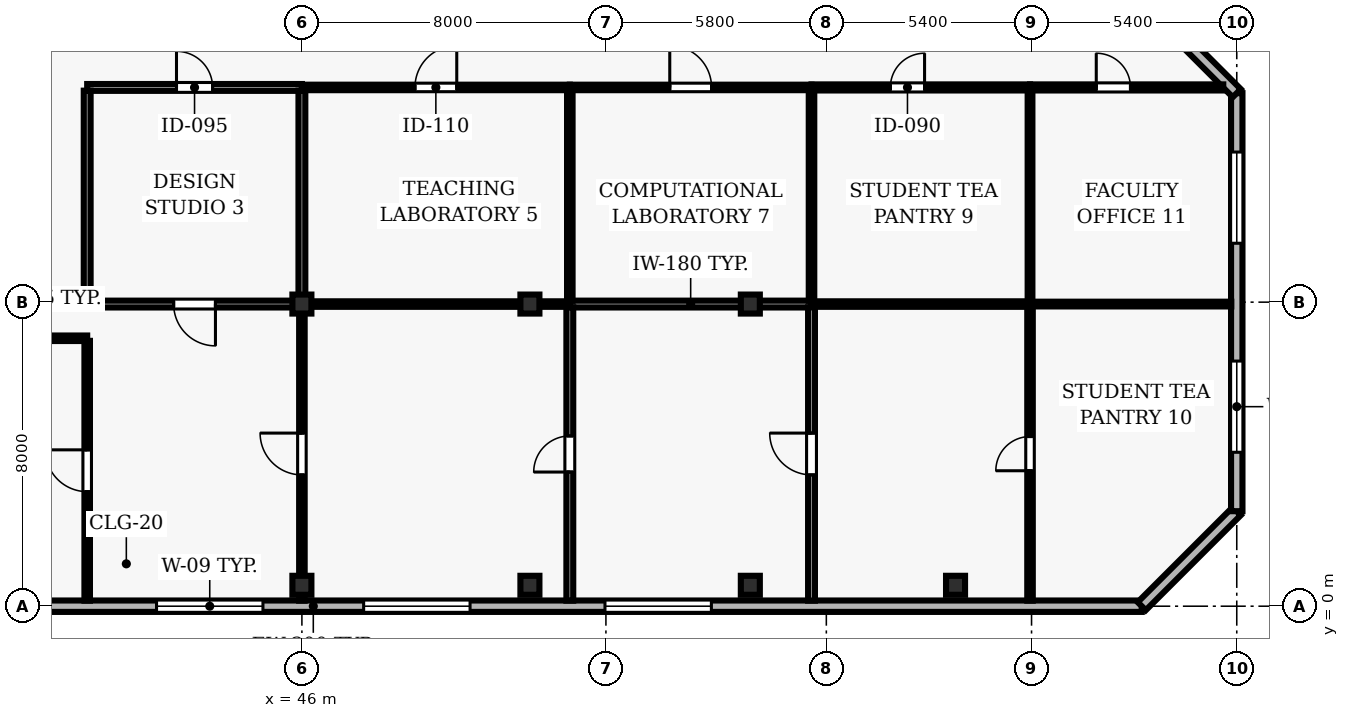
"""IFC4 building model, lengths in metres.
Left out: names, types, materials, properties, quantities, classifications, styles, units other than length and angle.
Written with IfcOpenShell. Run it as: python <this file> out.ifc"""

import sys

from ifc_helpers import new_model, si_unit, direction, frame, frame_2d, origin, origin_2d, place, context, subcontext, project, spatial, rectangle, hollow_rectangle, extrude, element, fill, save


model = new_model("IFC4")
c1 = context("Model", 3, precision=1e-05, world=origin(), true_north=direction((0.0, 1.0)))
c2 = subcontext(c1, "Body", "Model", "MODEL_VIEW")
j1 = project(units=[si_unit("LENGTHUNIT", "METRE"), si_unit("PLANEANGLEUNIT", "RADIAN")], contexts=[c1])
p1 = place(None, origin())
s1 = spatial("IfcSite", under=j1, at=p1, CompositionType="ELEMENT")
p2 = place(p1, origin())
s2 = spatial("IfcBuilding", under=s1, at=p2, CompositionType="ELEMENT")
p3 = place(p2, frame((0.0, 0.0, 134.6)))
s3 = spatial("IfcBuildingStorey", under=s2, at=p3, CompositionType="ELEMENT", Elevation=134.6)
for number, where, z_axis, x_axis in (
    (1, (46.0, 0.55, 0.0), (0.0, 0.0, 1.0), (1.0, 0.0, 0.0)),
    (2, (46.0, 7.95, 0.0), (0.0, 0.0, 1.0), (1.0, 0.0, 0.0)),
    (3, (52.0, 0.55, 0.0), (0.0, 0.0, 1.0), (1.0, 0.0, 0.0)),
    (4, (52.0, 7.95, 0.0), (0.0, 0.0, 1.0), (1.0, 0.0, 0.0)),
    (5, (57.8, 0.55, 0.0), (0.0, 0.0, 1.0), (1.0, 0.0, 0.0)),
    (6, (57.8, 7.95, 0.0), (0.0, 0.0, 1.0), (1.0, 0.0, 0.0)),
    (7, (63.2, 0.55, 0.0), (0.0, 0.0, 1.0), (1.0, 0.0, 0.0)),
):
    element("IfcColumn", number, at=place(p3, frame(where, z_axis=z_axis, x_axis=x_axis)), inside=s3, PredefinedType="COLUMN", context=c2, shape_type="SweptSolid", body=[
        extrude(hollow_rectangle(XDim=0.5, YDim=0.5, WallThickness=0.025, at=origin_2d()), origin(), (0.0, 0.0, 1.0), 3.9),
    ])
p4 = place(p3, frame((24.5, 0.0, 0.0), z_axis=(0.0, 0.0, 1.0), x_axis=(1.0, 0.0, 0.0)))
e8 = element("IfcWall", 8, at=p4, inside=s3, PredefinedType="SOLIDWALL", context=c2, shape_type="SweptSolid", body=[
    extrude(rectangle(XDim=43.6, YDim=0.3, at=frame_2d((21.8, 0.0))), origin(), (0.0, 0.0, 1.0), 3.69),
])
p5 = place(p4, frame((1.325, 0.0, 0.9)))
e9 = element("IfcOpeningElement", 9, at=p5, cuts=e8, PredefinedType="OPENING", context=c2, shape_type="SweptSolid", body=[
    extrude(rectangle(XDim=2.8, YDim=1.8, at=frame_2d((1.4, 0.9))), frame((0.0, 0.16, 0.0), z_axis=(0.0, -1.0, 0.0), x_axis=(1.0, 0.0, 0.0)), (0.0, 0.0, 1.0), 0.32),
])
p6 = place(p4, frame((17.675, 0.0, 0.9)))
e10 = element("IfcOpeningElement", 10, at=p6, cuts=e8, PredefinedType="OPENING", context=c2, shape_type="SweptSolid", body=[
    extrude(rectangle(XDim=2.8, YDim=1.8, at=frame_2d((1.4, 0.9))), frame((0.0, 0.16, 0.0), z_axis=(0.0, -1.0, 0.0), x_axis=(1.0, 0.0, 0.0)), (0.0, 0.0, 1.0), 0.32),
])
p7 = place(p4, frame((23.125, 0.0, 0.9)))
e11 = element("IfcOpeningElement", 11, at=p7, cuts=e8, PredefinedType="OPENING", context=c2, shape_type="SweptSolid", body=[
    extrude(rectangle(XDim=2.8, YDim=1.8, at=frame_2d((1.4, 0.9))), frame((0.0, 0.16, 0.0), z_axis=(0.0, -1.0, 0.0), x_axis=(1.0, 0.0, 0.0)), (0.0, 0.0, 1.0), 0.32),
])
p8 = place(p4, frame((29.475, 0.0, 0.9)))
e12 = element("IfcOpeningElement", 12, at=p8, cuts=e8, PredefinedType="OPENING", context=c2, shape_type="SweptSolid", body=[
    extrude(rectangle(XDim=2.8, YDim=1.8, at=frame_2d((1.4, 0.9))), frame((0.0, 0.16, 0.0), z_axis=(0.0, -1.0, 0.0), x_axis=(1.0, 0.0, 0.0)), (0.0, 0.0, 1.0), 0.32),
])
p9 = place(p3, frame((68.1, 0.0, 0.0), z_axis=(0.0, 0.0, 1.0), x_axis=(0.707106781187, 0.707106781187, 0.0)))
e13 = element("IfcWall", 13, at=p9, inside=s3, PredefinedType="SOLIDWALL", context=c2, shape_type="SweptSolid", body=[
    extrude(rectangle(XDim=3.536, YDim=0.3, at=frame_2d((1.768, 0.0))), origin(), (0.0, 0.0, 1.0), 3.69),
])
p10 = place(p3, frame((70.6, 2.5, 0.0), z_axis=(0.0, 0.0, 1.0), x_axis=(0.0, 1.0, 0.0)))
e14 = element("IfcWall", 14, at=p10, inside=s3, PredefinedType="SOLIDWALL", context=c2, shape_type="SweptSolid", body=[
    extrude(rectangle(XDim=11.0, YDim=0.3, at=frame_2d((5.5, 0.0))), origin(), (0.0, 0.0, 1.0), 3.69),
])
p11 = place(p10, frame((1.55, 0.0, 0.9)))
e15 = element("IfcOpeningElement", 15, at=p11, cuts=e14, PredefinedType="OPENING", context=c2, shape_type="SweptSolid", body=[
    extrude(rectangle(XDim=2.4, YDim=2.2, at=frame_2d((1.2, 1.1))), frame((0.0, 0.16, 0.0), z_axis=(0.0, -1.0, 0.0), x_axis=(1.0, 0.0, 0.0)), (0.0, 0.0, 1.0), 0.32),
])
p12 = place(p10, frame((7.05, 0.0, 0.9)))
e16 = element("IfcOpeningElement", 16, at=p12, cuts=e14, PredefinedType="OPENING", context=c2, shape_type="SweptSolid", body=[
    extrude(rectangle(XDim=2.4, YDim=2.2, at=frame_2d((1.2, 1.1))), frame((0.0, 0.16, 0.0), z_axis=(0.0, -1.0, 0.0), x_axis=(1.0, 0.0, 0.0)), (0.0, 0.0, 1.0), 0.32),
])
p13 = place(p3, frame((70.6, 13.5, 0.0), z_axis=(0.0, 0.0, 1.0), x_axis=(-0.707106781187, 0.707106781187, 0.0)))
e17 = element("IfcWall", 17, at=p13, inside=s3, PredefinedType="SOLIDWALL", context=c2, shape_type="SweptSolid", body=[
    extrude(rectangle(XDim=3.536, YDim=0.3, at=frame_2d((1.768, 0.0))), origin(), (0.0, 0.0, 1.0), 3.69),
])
p14 = place(p3, frame((38.05, 7.05, 0.0), z_axis=(0.0, 0.0, 1.0), x_axis=(1.0, 0.0, 0.0)))
e18 = element("IfcWall", 18, at=p14, inside=s3, PredefinedType="PARTITIONING", context=c2, shape_type="SweptSolid", body=[
    extrude(rectangle(XDim=2.3, YDim=0.145, at=frame_2d((1.15, 0.0))), origin(), (0.0, 0.0, 1.0), 3.69),
])
p15 = place(p3, frame((40.35, 13.65, 0.0), z_axis=(0.0, 0.0, 1.0), x_axis=(1.0, 0.0, 0.0)))
e19 = element("IfcWall", 19, at=p15, inside=s3, PredefinedType="PARTITIONING", context=c2, shape_type="SweptSolid", body=[
    extrude(rectangle(XDim=5.65, YDim=0.18, at=frame_2d((2.825, 0.0))), origin(), (0.0, 0.0, 1.0), 3.69),
])
p16 = place(p15, frame((2.35, 0.0, 0.0)))
e20 = element("IfcOpeningElement", 20, at=p16, cuts=e19, PredefinedType="OPENING", context=c2, shape_type="SweptSolid", body=[
    extrude(rectangle(XDim=0.95, YDim=2.1, at=frame_2d((0.475, 1.05))), frame((0.0, 0.1, 0.0), z_axis=(0.0, -1.0, 0.0), x_axis=(1.0, 0.0, 0.0)), (0.0, 0.0, 1.0), 0.2),
])
p17 = place(p3, frame((46.0, 7.95, 0.0), z_axis=(0.0, 0.0, 1.0), x_axis=(-1.0, 0.0, 0.0)))
e21 = element("IfcWall", 21, at=p17, inside=s3, PredefinedType="PARTITIONING", context=c2, shape_type="SweptSolid", body=[
    extrude(rectangle(XDim=5.65, YDim=0.18, at=frame_2d((2.825, 0.0))), origin(), (0.0, 0.0, 1.0), 3.074),
])
p18 = place(p17, frame((2.275, 0.0, 0.0)))
e22 = element("IfcOpeningElement", 22, at=p18, cuts=e21, PredefinedType="OPENING", context=c2, shape_type="SweptSolid", body=[
    extrude(rectangle(XDim=1.1, YDim=2.15, at=frame_2d((0.55, 1.075))), frame((0.0, 0.1, 0.0), z_axis=(0.0, -1.0, 0.0), x_axis=(1.0, 0.0, 0.0)), (0.0, 0.0, 1.0), 0.2),
])
p19 = place(p3, frame((46.0, 13.65, 0.0), z_axis=(0.0, 0.0, 1.0), x_axis=(1.0, 0.0, 0.0)))
e23 = element("IfcWall", 23, at=p19, inside=s3, PredefinedType="PARTITIONING", context=c2, shape_type="SweptSolid", body=[
    extrude(rectangle(XDim=7.05, YDim=0.145, at=frame_2d((3.525, 0.0))), origin(), (0.0, 0.0, 1.0), 3.69),
])
p20 = place(p19, frame((2.975, 0.0, 0.0)))
e24 = element("IfcOpeningElement", 24, at=p20, cuts=e23, PredefinedType="OPENING", context=c2, shape_type="SweptSolid", body=[
    extrude(rectangle(XDim=1.1, YDim=2.15, at=frame_2d((0.55, 1.075))), frame((0.0, 0.083, 0.0), z_axis=(0.0, -1.0, 0.0), x_axis=(1.0, 0.0, 0.0)), (0.0, 0.0, 1.0), 0.165),
])
p21 = place(p3, frame((53.05, 7.95, 0.0), z_axis=(0.0, 0.0, 1.0), x_axis=(-1.0, 0.0, 0.0)))
e25 = element("IfcWall", 25, at=p21, inside=s3, PredefinedType="PARTITIONING", context=c2, shape_type="SweptSolid", body=[
    extrude(rectangle(XDim=7.05, YDim=0.145, at=frame_2d((3.525, 0.0))), origin(), (0.0, 0.0, 1.0), 3.074),
])
p22 = place(p3, frame((53.05, 13.65, 0.0), z_axis=(0.0, 0.0, 1.0), x_axis=(1.0, 0.0, 0.0)))
e26 = element("IfcWall", 26, at=p22, inside=s3, PredefinedType="PARTITIONING", context=c2, shape_type="SweptSolid", body=[
    extrude(rectangle(XDim=6.36, YDim=0.145, at=frame_2d((3.18, 0.0))), origin(), (0.0, 0.0, 1.0), 3.69),
])
p23 = place(p22, frame((2.63, 0.0, 0.0)))
e27 = element("IfcOpeningElement", 27, at=p23, cuts=e26, PredefinedType="OPENING", context=c2, shape_type="SweptSolid", body=[
    extrude(rectangle(XDim=1.1, YDim=2.15, at=frame_2d((0.55, 1.075))), frame((0.0, 0.083, 0.0), z_axis=(0.0, -1.0, 0.0), x_axis=(1.0, 0.0, 0.0)), (0.0, 0.0, 1.0), 0.165),
])
p24 = place(p3, frame((59.41, 7.95, 0.0), z_axis=(0.0, 0.0, 1.0), x_axis=(-1.0, 0.0, 0.0)))
e28 = element("IfcWall", 28, at=p24, inside=s3, PredefinedType="PARTITIONING", context=c2, shape_type="SweptSolid", body=[
    extrude(rectangle(XDim=6.36, YDim=0.18, at=frame_2d((3.18, 0.0))), origin(), (0.0, 0.0, 1.0), 3.074),
])
p25 = place(p3, frame((59.41, 13.65, 0.0), z_axis=(0.0, 0.0, 1.0), x_axis=(1.0, 0.0, 0.0)))
e29 = element("IfcWall", 29, at=p25, inside=s3, PredefinedType="PARTITIONING", context=c2, shape_type="SweptSolid", body=[
    extrude(rectangle(XDim=5.75, YDim=0.16, at=frame_2d((2.875, 0.0))), origin(), (0.0, 0.0, 1.0), 3.69),
])
p26 = place(p25, frame((2.075, 0.0, 0.0)))
e30 = element("IfcOpeningElement", 30, at=p26, cuts=e29, PredefinedType="OPENING", context=c2, shape_type="SweptSolid", body=[
    extrude(rectangle(XDim=0.9, YDim=2.1, at=frame_2d((0.45, 1.05))), frame((0.0, 0.09, 0.0), z_axis=(0.0, -1.0, 0.0), x_axis=(1.0, 0.0, 0.0)), (0.0, 0.0, 1.0), 0.18),
])
p27 = place(p3, frame((65.16, 7.95, 0.0), z_axis=(0.0, 0.0, 1.0), x_axis=(-1.0, 0.0, 0.0)))
e31 = element("IfcWall", 31, at=p27, inside=s3, PredefinedType="PARTITIONING", context=c2, shape_type="SweptSolid", body=[
    extrude(rectangle(XDim=5.75, YDim=0.145, at=frame_2d((2.875, 0.0))), origin(), (0.0, 0.0, 1.0), 3.69),
])
p28 = place(p3, frame((65.16, 13.65, 0.0), z_axis=(0.0, 0.0, 1.0), x_axis=(1.0, 0.0, 0.0)))
e32 = element("IfcWall", 32, at=p28, inside=s3, PredefinedType="PARTITIONING", context=c2, shape_type="SweptSolid", body=[
    extrude(rectangle(XDim=5.085, YDim=0.16, at=frame_2d((2.542, 0.0))), origin(), (0.0, 0.0, 1.0), 3.69),
])
p29 = place(p28, frame((1.743, 0.0, 0.0)))
e33 = element("IfcOpeningElement", 33, at=p29, cuts=e32, PredefinedType="OPENING", context=c2, shape_type="SweptSolid", body=[
    extrude(rectangle(XDim=0.9, YDim=2.1, at=frame_2d((0.45, 1.05))), frame((0.0, 0.09, 0.0), z_axis=(0.0, -1.0, 0.0), x_axis=(1.0, 0.0, 0.0)), (0.0, 0.0, 1.0), 0.18),
])
p30 = place(p3, frame((70.455, 7.95, 0.0), z_axis=(0.0, 0.0, 1.0), x_axis=(-1.0, 0.0, 0.0)))
e34 = element("IfcWall", 34, at=p30, inside=s3, PredefinedType="PARTITIONING", context=c2, shape_type="SweptSolid", body=[
    extrude(rectangle(XDim=5.295, YDim=0.125, at=frame_2d((2.647, 0.0))), origin(), (0.0, 0.0, 1.0), 3.69),
])
p31 = place(p3, frame((40.35, 0.145, 0.0), z_axis=(0.0, 0.0, 1.0), x_axis=(0.0, 1.0, 0.0)))
e35 = element("IfcWall", 35, at=p31, inside=s3, PredefinedType="PARTITIONING", context=c2, shape_type="SweptSolid", body=[
    extrude(rectangle(XDim=6.837, YDim=0.145, at=frame_2d((3.418, 0.0))), origin(), (0.0, 0.0, 1.0), 3.69),
])
p32 = place(p31, frame((2.869, 0.0, 0.0)))
e36 = element("IfcOpeningElement", 36, at=p32, cuts=e35, PredefinedType="OPENING", context=c2, shape_type="SweptSolid", body=[
    extrude(rectangle(XDim=1.1, YDim=2.15, at=frame_2d((0.55, 1.075))), frame((0.0, 0.083, 0.0), z_axis=(0.0, -1.0, 0.0), x_axis=(1.0, 0.0, 0.0)), (0.0, 0.0, 1.0), 0.165),
])
p33 = place(p3, frame((40.35, 8.035, 0.0), z_axis=(0.0, 0.0, 1.0), x_axis=(0.0, 1.0, 0.0)))
e37 = element("IfcWall", 37, at=p33, inside=s3, PredefinedType="PARTITIONING", context=c2, shape_type="SweptSolid", body=[
    extrude(rectangle(XDim=5.53, YDim=0.18, at=frame_2d((2.765, 0.0))), origin(), (0.0, 0.0, 1.0), 3.69),
])
p34 = place(p3, frame((46.0, 0.145, 0.0), z_axis=(0.0, 0.0, 1.0), x_axis=(0.0, 1.0, 0.0)))
e38 = element("IfcWall", 38, at=p34, inside=s3, PredefinedType="PARTITIONING", context=c2, shape_type="SweptSolid", body=[
    extrude(rectangle(XDim=7.72, YDim=0.145, at=frame_2d((3.86, 0.0))), origin(), (0.0, 0.0, 1.0), 3.074),
])
p35 = place(p34, frame((3.31, 0.0, 0.0)))
e39 = element("IfcOpeningElement", 39, at=p35, cuts=e38, PredefinedType="OPENING", context=c2, shape_type="SweptSolid", body=[
    extrude(rectangle(XDim=1.1, YDim=2.15, at=frame_2d((0.55, 1.075))), frame((0.0, 0.083, 0.0), z_axis=(0.0, -1.0, 0.0), x_axis=(1.0, 0.0, 0.0)), (0.0, 0.0, 1.0), 0.165),
])
p36 = place(p3, frame((46.0, 8.035, 0.0), z_axis=(0.0, 0.0, 1.0), x_axis=(0.0, 1.0, 0.0)))
e40 = element("IfcWall", 40, at=p36, inside=s3, PredefinedType="PARTITIONING", context=c2, shape_type="SweptSolid", body=[
    extrude(rectangle(XDim=5.53, YDim=0.18, at=frame_2d((2.765, 0.0))), origin(), (0.0, 0.0, 1.0), 3.074),
])
p37 = place(p3, frame((53.05, 0.145, 0.0), z_axis=(0.0, 0.0, 1.0), x_axis=(0.0, 1.0, 0.0)))
e41 = element("IfcWall", 41, at=p37, inside=s3, PredefinedType="PARTITIONING", context=c2, shape_type="SweptSolid", body=[
    extrude(rectangle(XDim=7.72, YDim=0.18, at=frame_2d((3.86, 0.0))), origin(), (0.0, 0.0, 1.0), 3.69),
])
p38 = place(p37, frame((3.385, 0.0, 0.0)))
e42 = element("IfcOpeningElement", 42, at=p38, cuts=e41, PredefinedType="OPENING", context=c2, shape_type="SweptSolid", body=[
    extrude(rectangle(XDim=0.95, YDim=2.1, at=frame_2d((0.475, 1.05))), frame((0.0, 0.1, 0.0), z_axis=(0.0, -1.0, 0.0), x_axis=(1.0, 0.0, 0.0)), (0.0, 0.0, 1.0), 0.2),
])
p39 = place(p3, frame((53.05, 8.035, 0.0), z_axis=(0.0, 0.0, 1.0), x_axis=(0.0, 1.0, 0.0)))
e43 = element("IfcWall", 43, at=p39, inside=s3, PredefinedType="PARTITIONING", context=c2, shape_type="SweptSolid", body=[
    extrude(rectangle(XDim=5.547, YDim=0.145, at=frame_2d((2.773, 0.0))), origin(), (0.0, 0.0, 1.0), 3.69),
])
p40 = place(p3, frame((59.41, 0.145, 0.0), z_axis=(0.0, 0.0, 1.0), x_axis=(0.0, 1.0, 0.0)))
e44 = element("IfcWall", 44, at=p40, inside=s3, PredefinedType="PARTITIONING", context=c2, shape_type="SweptSolid", body=[
    extrude(rectangle(XDim=7.72, YDim=0.18, at=frame_2d((3.86, 0.0))), origin(), (0.0, 0.0, 1.0), 3.69),
])
p41 = place(p40, frame((3.31, 0.0, 0.0)))
e45 = element("IfcOpeningElement", 45, at=p41, cuts=e44, PredefinedType="OPENING", context=c2, shape_type="SweptSolid", body=[
    extrude(rectangle(XDim=1.1, YDim=2.15, at=frame_2d((0.55, 1.075))), frame((0.0, 0.1, 0.0), z_axis=(0.0, -1.0, 0.0), x_axis=(1.0, 0.0, 0.0)), (0.0, 0.0, 1.0), 0.2),
])
p42 = place(p3, frame((59.41, 8.035, 0.0), z_axis=(0.0, 0.0, 1.0), x_axis=(0.0, 1.0, 0.0)))
e46 = element("IfcWall", 46, at=p42, inside=s3, PredefinedType="PARTITIONING", context=c2, shape_type="SweptSolid", body=[
    extrude(rectangle(XDim=5.54, YDim=0.145, at=frame_2d((2.77, 0.0))), origin(), (0.0, 0.0, 1.0), 3.69),
])
p43 = place(p3, frame((65.16, 0.145, 0.0), z_axis=(0.0, 0.0, 1.0), x_axis=(0.0, 1.0, 0.0)))
e47 = element("IfcWall", 47, at=p43, inside=s3, PredefinedType="PARTITIONING", context=c2, shape_type="SweptSolid", body=[
    extrude(rectangle(XDim=7.738, YDim=0.145, at=frame_2d((3.869, 0.0))), origin(), (0.0, 0.0, 1.0), 3.69),
])
p44 = place(p43, frame((3.419, 0.0, 0.0)))
e48 = element("IfcOpeningElement", 48, at=p44, cuts=e47, PredefinedType="OPENING", context=c2, shape_type="SweptSolid", body=[
    extrude(rectangle(XDim=0.9, YDim=2.1, at=frame_2d((0.45, 1.05))), frame((0.0, 0.083, 0.0), z_axis=(0.0, -1.0, 0.0), x_axis=(1.0, 0.0, 0.0)), (0.0, 0.0, 1.0), 0.165),
])
p45 = place(p3, frame((65.16, 8.018, 0.0), z_axis=(0.0, 0.0, 1.0), x_axis=(0.0, 1.0, 0.0)))
e49 = element("IfcWall", 49, at=p45, inside=s3, PredefinedType="PARTITIONING", context=c2, shape_type="SweptSolid", body=[
    extrude(rectangle(XDim=5.557, YDim=0.125, at=frame_2d((2.778, 0.0))), origin(), (0.0, 0.0, 1.0), 3.69),
])
p46 = place(p6, origin())
e50 = element("IfcWindow", 50, at=p46, inside=s3, PartitioningType="SINGLE_PANEL", PredefinedType="WINDOW", context=c2, shape_type="SweptSolid", body=[
    extrude(rectangle(XDim=2.8, YDim=1.8, at=frame_2d((1.4, 0.9))), frame((0.0, 0.03, 0.0), z_axis=(0.0, -1.0, 0.0), x_axis=(1.0, 0.0, 0.0)), (0.0, 0.0, 1.0), 0.06),
])
fill(e10, e50)
p47 = place(p7, origin())
e51 = element("IfcWindow", 51, at=p47, inside=s3, PartitioningType="SINGLE_PANEL", PredefinedType="WINDOW", context=c2, shape_type="SweptSolid", body=[
    extrude(rectangle(XDim=2.8, YDim=1.8, at=frame_2d((1.4, 0.9))), frame((0.0, 0.03, 0.0), z_axis=(0.0, -1.0, 0.0), x_axis=(1.0, 0.0, 0.0)), (0.0, 0.0, 1.0), 0.06),
])
fill(e11, e51)
p48 = place(p8, origin())
e52 = element("IfcWindow", 52, at=p48, inside=s3, PartitioningType="SINGLE_PANEL", PredefinedType="WINDOW", context=c2, shape_type="SweptSolid", body=[
    extrude(rectangle(XDim=2.8, YDim=1.8, at=frame_2d((1.4, 0.9))), frame((0.0, 0.03, 0.0), z_axis=(0.0, -1.0, 0.0), x_axis=(1.0, 0.0, 0.0)), (0.0, 0.0, 1.0), 0.06),
])
fill(e12, e52)
p49 = place(p11, origin())
e53 = element("IfcWindow", 53, at=p49, inside=s3, PartitioningType="SINGLE_PANEL", PredefinedType="WINDOW", context=c2, shape_type="SweptSolid", body=[
    extrude(rectangle(XDim=2.4, YDim=2.2, at=frame_2d((1.2, 1.1))), frame((0.0, 0.03, 0.0), z_axis=(0.0, -1.0, 0.0), x_axis=(1.0, 0.0, 0.0)), (0.0, 0.0, 1.0), 0.06),
])
fill(e15, e53)
p50 = place(p12, origin())
e54 = element("IfcWindow", 54, at=p50, inside=s3, PartitioningType="SINGLE_PANEL", PredefinedType="WINDOW", context=c2, shape_type="SweptSolid", body=[
    extrude(rectangle(XDim=2.4, YDim=2.2, at=frame_2d((1.2, 1.1))), frame((0.0, 0.03, 0.0), z_axis=(0.0, -1.0, 0.0), x_axis=(1.0, 0.0, 0.0)), (0.0, 0.0, 1.0), 0.06),
])
fill(e16, e54)
p51 = place(p16, origin())
e55 = element("IfcDoor", 55, at=p51, inside=s3, OperationType="SINGLE_SWING_LEFT", PredefinedType="DOOR", context=c2, shape_type="SweptSolid", body=[
    extrude(rectangle(XDim=0.95, YDim=2.1, at=frame_2d((0.475, 1.05))), frame((0.0, 0.025, 0.0), z_axis=(0.0, -1.0, 0.0), x_axis=(1.0, 0.0, 0.0)), (0.0, 0.0, 1.0), 0.05),
])
fill(e20, e55)
p52 = place(p20, origin())
e56 = element("IfcDoor", 56, at=p52, inside=s3, OperationType="SINGLE_SWING_RIGHT", PredefinedType="DOOR", context=c2, shape_type="SweptSolid", body=[
    extrude(rectangle(XDim=1.1, YDim=2.15, at=frame_2d((0.55, 1.075))), frame((0.0, 0.025, 0.0), z_axis=(0.0, -1.0, 0.0), x_axis=(1.0, 0.0, 0.0)), (0.0, 0.0, 1.0), 0.05),
])
fill(e24, e56)
p53 = place(p23, origin())
e57 = element("IfcDoor", 57, at=p53, inside=s3, OperationType="SINGLE_SWING_LEFT", PredefinedType="DOOR", context=c2, shape_type="SweptSolid", body=[
    extrude(rectangle(XDim=1.1, YDim=2.15, at=frame_2d((0.55, 1.075))), frame((0.0, 0.025, 0.0), z_axis=(0.0, -1.0, 0.0), x_axis=(1.0, 0.0, 0.0)), (0.0, 0.0, 1.0), 0.05),
])
fill(e27, e57)
p54 = place(p26, origin())
e58 = element("IfcDoor", 58, at=p54, inside=s3, OperationType="SINGLE_SWING_RIGHT", PredefinedType="DOOR", context=c2, shape_type="SweptSolid", body=[
    extrude(rectangle(XDim=0.9, YDim=2.1, at=frame_2d((0.45, 1.05))), frame((0.0, 0.025, 0.0), z_axis=(0.0, -1.0, 0.0), x_axis=(1.0, 0.0, 0.0)), (0.0, 0.0, 1.0), 0.05),
])
fill(e30, e58)
p55 = place(p29, origin())
e59 = element("IfcDoor", 59, at=p55, inside=s3, OperationType="SINGLE_SWING_LEFT", PredefinedType="DOOR", context=c2, shape_type="SweptSolid", body=[
    extrude(rectangle(XDim=0.9, YDim=2.1, at=frame_2d((0.45, 1.05))), frame((0.0, 0.025, 0.0), z_axis=(0.0, -1.0, 0.0), x_axis=(1.0, 0.0, 0.0)), (0.0, 0.0, 1.0), 0.05),
])
fill(e33, e59)
p56 = place(p18, origin())
e60 = element("IfcDoor", 60, at=p56, inside=s3, OperationType="SINGLE_SWING_LEFT", PredefinedType="DOOR", context=c2, shape_type="SweptSolid", body=[
    extrude(rectangle(XDim=1.1, YDim=2.15, at=frame_2d((0.55, 1.075))), frame((0.0, 0.025, 0.0), z_axis=(0.0, -1.0, 0.0), x_axis=(1.0, 0.0, 0.0)), (0.0, 0.0, 1.0), 0.05),
])
fill(e22, e60)
p57 = place(p35, origin())
e61 = element("IfcDoor", 61, at=p57, inside=s3, OperationType="SINGLE_SWING_RIGHT", PredefinedType="DOOR", context=c2, shape_type="SweptSolid", body=[
    extrude(rectangle(XDim=1.1, YDim=2.15, at=frame_2d((0.55, 1.075))), frame((0.0, 0.025, 0.0), z_axis=(0.0, -1.0, 0.0), x_axis=(1.0, 0.0, 0.0)), (0.0, 0.0, 1.0), 0.05),
])
fill(e39, e61)
p58 = place(p38, origin())
e62 = element("IfcDoor", 62, at=p58, inside=s3, OperationType="SINGLE_SWING_LEFT", PredefinedType="DOOR", context=c2, shape_type="SweptSolid", body=[
    extrude(rectangle(XDim=0.95, YDim=2.1, at=frame_2d((0.475, 1.05))), frame((0.0, 0.025, 0.0), z_axis=(0.0, -1.0, 0.0), x_axis=(1.0, 0.0, 0.0)), (0.0, 0.0, 1.0), 0.05),
])
fill(e42, e62)
p59 = place(p41, origin())
e63 = element("IfcDoor", 63, at=p59, inside=s3, OperationType="SINGLE_SWING_RIGHT", PredefinedType="DOOR", context=c2, shape_type="SweptSolid", body=[
    extrude(rectangle(XDim=1.1, YDim=2.15, at=frame_2d((0.55, 1.075))), frame((0.0, 0.025, 0.0), z_axis=(0.0, -1.0, 0.0), x_axis=(1.0, 0.0, 0.0)), (0.0, 0.0, 1.0), 0.05),
])
fill(e45, e63)
p60 = place(p44, origin())
e64 = element("IfcDoor", 64, at=p60, inside=s3, OperationType="SINGLE_SWING_LEFT", PredefinedType="DOOR", context=c2, shape_type="SweptSolid", body=[
    extrude(rectangle(XDim=0.9, YDim=2.1, at=frame_2d((0.45, 1.05))), frame((0.0, 0.025, 0.0), z_axis=(0.0, -1.0, 0.0), x_axis=(1.0, 0.0, 0.0)), (0.0, 0.0, 1.0), 0.05),
])
fill(e48, e64)
p61 = place(p32, origin())
e65 = element("IfcDoor", 65, at=p61, inside=s3, OperationType="SINGLE_SWING_RIGHT", PredefinedType="DOOR", context=c2, shape_type="SweptSolid", body=[
    extrude(rectangle(XDim=1.1, YDim=2.15, at=frame_2d((0.55, 1.075))), frame((0.0, 0.025, 0.0), z_axis=(0.0, -1.0, 0.0), x_axis=(1.0, 0.0, 0.0)), (0.0, 0.0, 1.0), 0.05),
])
fill(e36, e65)
save(model, sys.argv[1])
